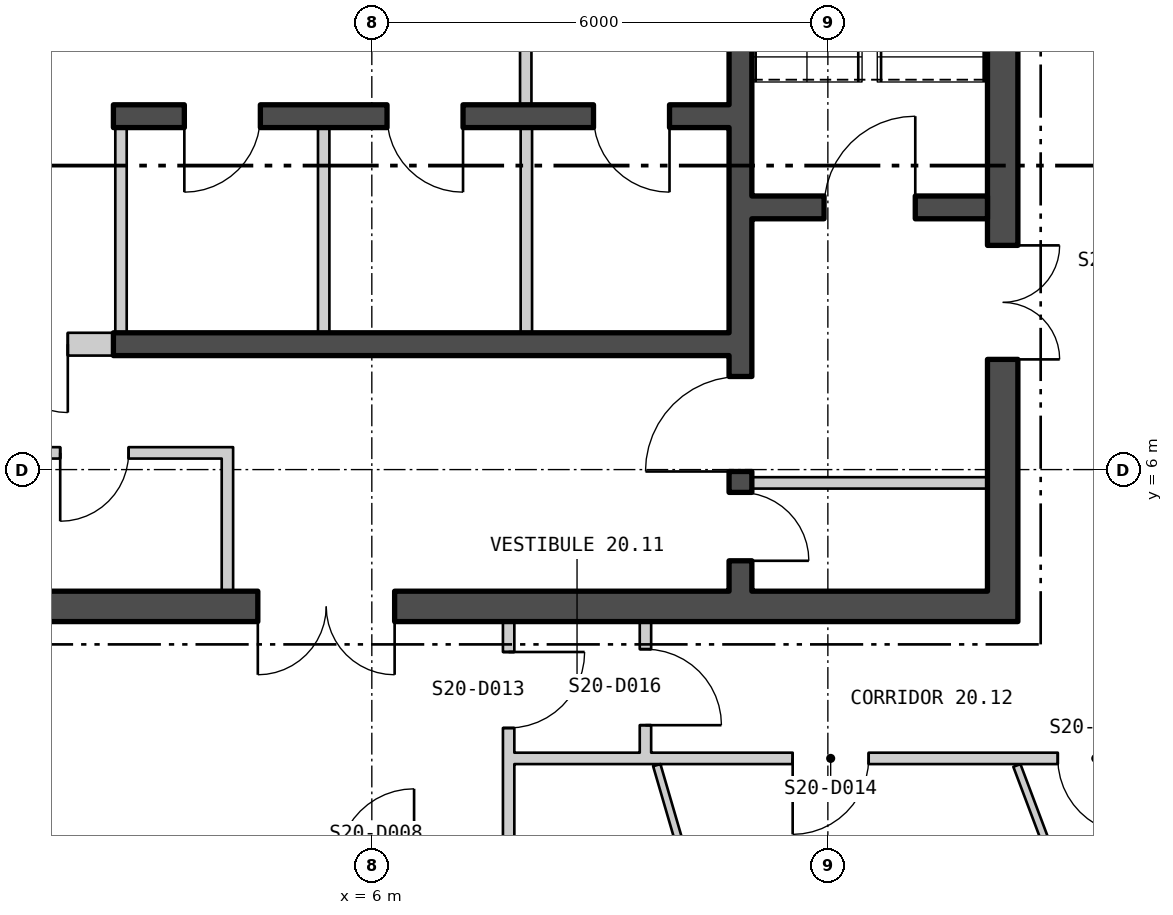
"""IFC4 building model, lengths in metres.
Left out: names, types, materials, properties, quantities, classifications, styles, units other than length and angle.
Written with IfcOpenShell. Run it as: python <this file> out.ifc"""

import sys

from ifc_helpers import new_model, si_unit, direction, frame, frame_2d, origin, place, context, subcontext, project, spatial, polyline, rectangle, outline, extrude, element, fill, save


model = new_model("IFC4")
c1 = context("Model", 3, precision=1e-05, world=origin(), true_north=direction((0.0, 1.0)))
c2 = subcontext(c1, "Body", "Model", "MODEL_VIEW")
j1 = project(units=[si_unit("LENGTHUNIT", "METRE"), si_unit("PLANEANGLEUNIT", "RADIAN")], contexts=[c1])
p1 = place(None, origin())
s1 = spatial("IfcSite", under=j1, at=p1, CompositionType="ELEMENT")
p2 = place(p1, origin())
s2 = spatial("IfcBuilding", under=s1, at=p2, CompositionType="ELEMENT")
p3 = place(p2, frame((0.0, 0.0, 268.8)))
s3 = spatial("IfcBuildingStorey", under=s2, at=p3, CompositionType="ELEMENT", Elevation=268.8)
p4 = place(p3, frame((2.67, -24.262, -0.18), z_axis=(0.0, 0.0, 1.0), x_axis=(0.499999764979, 0.866025539474, 0.0)))
e1 = element("IfcWall", 1, at=p4, inside=s3, PredefinedType="SOLIDWALL", context=c2, shape_type="SweptSolid", body=[
    extrude(outline(polyline([(-0.13, -0.225), (45.87, -0.225), (45.61, 0.225), (0.13, 0.225), (-0.13, -0.225)])), origin(), (0.0, 0.0, 1.0), 3.68),
])
p5 = place(p4, frame((1.424, 0.0, 1.08)))
e2 = element("IfcOpeningElement", 2, at=p5, cuts=e1, PredefinedType="OPENING", context=c2, shape_type="SweptSolid", body=[
    extrude(rectangle(XDim=2.4, YDim=2.0, at=frame_2d((1.2, 1.0))), frame((0.0, 0.235, 0.0), z_axis=(0.0, -1.0, 0.0), x_axis=(1.0, 0.0, 0.0)), (0.0, 0.0, 1.0), 0.47),
])
p6 = place(p4, frame((5.893, 0.0, 1.08)))
e3 = element("IfcOpeningElement", 3, at=p6, cuts=e1, PredefinedType="OPENING", context=c2, shape_type="SweptSolid", body=[
    extrude(rectangle(XDim=2.4, YDim=2.0, at=frame_2d((1.2, 1.0))), frame((0.0, 0.235, 0.0), z_axis=(0.0, -1.0, 0.0), x_axis=(1.0, 0.0, 0.0)), (0.0, 0.0, 1.0), 0.47),
])
p7 = place(p4, frame((10.401, 0.0, 1.08)))
e4 = element("IfcOpeningElement", 4, at=p7, cuts=e1, PredefinedType="OPENING", context=c2, shape_type="SweptSolid", body=[
    extrude(rectangle(XDim=2.4, YDim=2.0, at=frame_2d((1.2, 1.0))), frame((0.0, 0.235, 0.0), z_axis=(0.0, -1.0, 0.0), x_axis=(1.0, 0.0, 0.0)), (0.0, 0.0, 1.0), 0.47),
])
p8 = place(p4, frame((14.909, 0.0, 1.08)))
e5 = element("IfcOpeningElement", 5, at=p8, cuts=e1, PredefinedType="OPENING", context=c2, shape_type="SweptSolid", body=[
    extrude(rectangle(XDim=2.4, YDim=2.0, at=frame_2d((1.2, 1.0))), frame((0.0, 0.235, 0.0), z_axis=(0.0, -1.0, 0.0), x_axis=(1.0, 0.0, 0.0)), (0.0, 0.0, 1.0), 0.47),
])
p9 = place(p4, frame((23.924, 0.0, 1.08)))
e6 = element("IfcOpeningElement", 6, at=p9, cuts=e1, PredefinedType="OPENING", context=c2, shape_type="SweptSolid", body=[
    extrude(rectangle(XDim=2.4, YDim=2.0, at=frame_2d((1.2, 1.0))), frame((0.0, 0.235, 0.0), z_axis=(0.0, -1.0, 0.0), x_axis=(1.0, 0.0, 0.0)), (0.0, 0.0, 1.0), 0.47),
])
p10 = place(p4, frame((28.431, 0.0, 1.08)))
e7 = element("IfcOpeningElement", 7, at=p10, cuts=e1, PredefinedType="OPENING", context=c2, shape_type="SweptSolid", body=[
    extrude(rectangle(XDim=2.4, YDim=2.0, at=frame_2d((1.2, 1.0))), frame((0.0, 0.235, 0.0), z_axis=(0.0, -1.0, 0.0), x_axis=(1.0, 0.0, 0.0)), (0.0, 0.0, 1.0), 0.47),
])
p11 = place(p4, frame((32.939, 0.0, 1.08)))
e8 = element("IfcOpeningElement", 8, at=p11, cuts=e1, PredefinedType="OPENING", context=c2, shape_type="SweptSolid", body=[
    extrude(rectangle(XDim=2.4, YDim=2.0, at=frame_2d((1.2, 1.0))), frame((0.0, 0.235, 0.0), z_axis=(0.0, -1.0, 0.0), x_axis=(1.0, 0.0, 0.0)), (0.0, 0.0, 1.0), 0.47),
])
p12 = place(p4, frame((37.447, 0.0, 1.08)))
e9 = element("IfcOpeningElement", 9, at=p12, cuts=e1, PredefinedType="OPENING", context=c2, shape_type="SweptSolid", body=[
    extrude(rectangle(XDim=2.4, YDim=2.0, at=frame_2d((1.2, 1.0))), frame((0.0, 0.235, 0.0), z_axis=(0.0, -1.0, 0.0), x_axis=(1.0, 0.0, 0.0)), (0.0, 0.0, 1.0), 0.47),
])
p13 = place(p4, frame((41.916, 0.0, 1.08)))
e10 = element("IfcOpeningElement", 10, at=p13, cuts=e1, PredefinedType="OPENING", context=c2, shape_type="SweptSolid", body=[
    extrude(rectangle(XDim=2.4, YDim=2.0, at=frame_2d((1.2, 1.0))), frame((0.0, 0.235, 0.0), z_axis=(0.0, -1.0, 0.0), x_axis=(1.0, 0.0, 0.0)), (0.0, 0.0, 1.0), 0.47),
])
p14 = place(p3, frame((-14.5, 4.2, 0.0), z_axis=(0.0, 0.0, 1.0), x_axis=(1.0, 0.0, 0.0)))
e11 = element("IfcWall", 11, at=p14, inside=s3, PredefinedType="SHEAR", context=c2, shape_type="SweptSolid", body=[
    extrude(rectangle(XDim=29.0, YDim=0.4, at=frame_2d((14.5, 0.0))), origin(), (0.0, 0.0, 1.0), 3.7),
])
p15 = place(p14, frame((9.0, 0.0, 0.0)))
e12 = element("IfcOpeningElement", 12, at=p15, cuts=e11, PredefinedType="OPENING", context=c2, shape_type="SweptSolid", body=[
    extrude(rectangle(XDim=1.8, YDim=2.4, at=frame_2d((0.9, 1.2))), frame((0.0, 0.21, 0.0), z_axis=(0.0, -1.0, 0.0), x_axis=(1.0, 0.0, 0.0)), (0.0, 0.0, 1.0), 0.42),
])
p16 = place(p14, frame((19.0, 0.0, 0.0)))
e13 = element("IfcOpeningElement", 13, at=p16, cuts=e11, PredefinedType="OPENING", context=c2, shape_type="SweptSolid", body=[
    extrude(rectangle(XDim=1.8, YDim=2.4, at=frame_2d((0.9, 1.2))), frame((0.0, 0.21, 0.0), z_axis=(0.0, -1.0, 0.0), x_axis=(1.0, 0.0, 0.0)), (0.0, 0.0, 1.0), 0.42),
])
p17 = place(p3, frame((14.3, 4.4, 0.0), z_axis=(0.0, 0.0, 1.0), x_axis=(0.0, 1.0, 0.0)))
e14 = element("IfcWall", 14, at=p17, inside=s3, PredefinedType="SHEAR", context=c2, shape_type="SweptSolid", body=[
    extrude(rectangle(XDim=13.2, YDim=0.4, at=frame_2d((6.6, 0.0))), origin(), (0.0, 0.0, 1.0), 3.7),
])
p18 = place(p17, frame((3.05, 0.0, 0.0)))
e15 = element("IfcOpeningElement", 15, at=p18, cuts=e14, PredefinedType="OPENING", context=c2, shape_type="SweptSolid", body=[
    extrude(rectangle(XDim=1.5, YDim=2.1, at=frame_2d((0.75, 1.05))), frame((0.0, 0.21, 0.0), z_axis=(0.0, -1.0, 0.0), x_axis=(1.0, 0.0, 0.0)), (0.0, 0.0, 1.0), 0.42),
])
p19 = place(p3, frame((10.85, 4.4, 0.0), z_axis=(0.0, 0.0, 1.0), x_axis=(0.0, 1.0, 0.0)))
e16 = element("IfcWall", 16, at=p19, inside=s3, PredefinedType="SHEAR", context=c2, shape_type="SweptSolid", body=[
    extrude(rectangle(XDim=13.2, YDim=0.3, at=frame_2d((6.6, 0.0))), origin(), (0.0, 0.0, 1.0), 3.7),
])
p20 = place(p19, frame((1.575, 0.0, 0.0)))
e17 = element("IfcOpeningElement", 17, at=p20, cuts=e16, PredefinedType="OPENING", context=c2, shape_type="SweptSolid", body=[
    extrude(rectangle(XDim=1.25, YDim=2.1, at=frame_2d((0.625, 1.05))), frame((0.0, 0.16, 0.0), z_axis=(0.0, -1.0, 0.0), x_axis=(1.0, 0.0, 0.0)), (0.0, 0.0, 1.0), 0.32),
])
p21 = place(p19, frame((0.4, 0.0, 0.0)))
e18 = element("IfcOpeningElement", 18, at=p21, cuts=e16, PredefinedType="OPENING", context=c2, shape_type="SweptSolid", body=[
    extrude(rectangle(XDim=0.9, YDim=2.1, at=frame_2d((0.45, 1.05))), frame((0.0, 0.16, 0.0), z_axis=(0.0, -1.0, 0.0), x_axis=(1.0, 0.0, 0.0)), (0.0, 0.0, 1.0), 0.32),
])
p22 = place(p3, frame((11.0, 9.45, 0.0), z_axis=(0.0, 0.0, 1.0), x_axis=(1.0, 0.0, 0.0)))
e19 = element("IfcWall", 19, at=p22, inside=s3, PredefinedType="SHEAR", context=c2, shape_type="SweptSolid", body=[
    extrude(rectangle(XDim=3.1, YDim=0.3, at=frame_2d((1.55, 0.0))), origin(), (0.0, 0.0, 1.0), 3.7),
])
p23 = place(p22, frame((0.95, 0.0, 0.0)))
e20 = element("IfcOpeningElement", 20, at=p23, cuts=e19, PredefinedType="OPENING", context=c2, shape_type="SweptSolid", body=[
    extrude(rectangle(XDim=1.2, YDim=2.1, at=frame_2d((0.6, 1.05))), frame((0.0, 0.16, 0.0), z_axis=(0.0, -1.0, 0.0), x_axis=(1.0, 0.0, 0.0)), (0.0, 0.0, 1.0), 0.32),
])
p24 = place(p3, frame((2.6, 10.65, 0.0), z_axis=(0.0, 0.0, 1.0), x_axis=(1.0, 0.0, 0.0)))
e21 = element("IfcWall", 21, at=p24, inside=s3, PredefinedType="SHEAR", context=c2, shape_type="SweptSolid", body=[
    extrude(rectangle(XDim=8.1, YDim=0.3, at=frame_2d((4.05, 0.0))), origin(), (0.0, 0.0, 1.0), 3.7),
])
p25 = place(p24, frame((0.933, 0.0, 0.0)))
e22 = element("IfcOpeningElement", 22, at=p25, cuts=e21, PredefinedType="OPENING", context=c2, shape_type="SweptSolid", body=[
    extrude(rectangle(XDim=1.0, YDim=2.1, at=frame_2d((0.5, 1.05))), frame((0.0, 0.16, 0.0), z_axis=(0.0, -1.0, 0.0), x_axis=(1.0, 0.0, 0.0)), (0.0, 0.0, 1.0), 0.32),
])
p26 = place(p24, frame((3.6, 0.0, 0.0)))
e23 = element("IfcOpeningElement", 23, at=p26, cuts=e21, PredefinedType="OPENING", context=c2, shape_type="SweptSolid", body=[
    extrude(rectangle(XDim=1.0, YDim=2.1, at=frame_2d((0.5, 1.05))), frame((0.0, 0.16, 0.0), z_axis=(0.0, -1.0, 0.0), x_axis=(1.0, 0.0, 0.0)), (0.0, 0.0, 1.0), 0.32),
])
p27 = place(p24, frame((6.317, 0.0, 0.0)))
e24 = element("IfcOpeningElement", 24, at=p27, cuts=e21, PredefinedType="OPENING", context=c2, shape_type="SweptSolid", body=[
    extrude(rectangle(XDim=1.0, YDim=2.1, at=frame_2d((0.5, 1.05))), frame((0.0, 0.16, 0.0), z_axis=(0.0, -1.0, 0.0), x_axis=(1.0, 0.0, 0.0)), (0.0, 0.0, 1.0), 0.32),
])
p28 = place(p3, frame((2.6, 7.65, 0.0), z_axis=(0.0, 0.0, 1.0), x_axis=(1.0, 0.0, 0.0)))
e25 = element("IfcWall", 25, at=p28, inside=s3, PredefinedType="SHEAR", context=c2, shape_type="SweptSolid", body=[
    extrude(rectangle(XDim=8.1, YDim=0.3, at=frame_2d((4.05, 0.0))), origin(), (0.0, 0.0, 1.0), 3.7),
])
for number, where, z_axis, x_axis in (
    (26, (2.7, 7.8, 0.0), (0.0, 0.0, 1.0), (0.0, 1.0, 0.0)),
    (27, (5.367, 7.8, 0.0), (0.0, 0.0, 1.0), (0.0, 1.0, 0.0)),
    (28, (8.033, 7.8, 0.0), (0.0, 0.0, 1.0), (0.0, 1.0, 0.0)),
):
    element("IfcWall", number, at=place(p3, frame(where, z_axis=z_axis, x_axis=x_axis)), inside=s3, PredefinedType="PARTITIONING", context=c2, shape_type="SweptSolid", body=[
        extrude(rectangle(XDim=2.7, YDim=0.15, at=frame_2d((1.35, 0.0))), origin(), (0.0, 0.0, 1.0), 3.7),
    ])
p29 = place(p3, frame((8.025, 10.8, 0.0), z_axis=(0.0, 0.0, 1.0), x_axis=(0.0, 1.0, 0.0)))
e29 = element("IfcWall", 29, at=p29, inside=s3, PredefinedType="PARTITIONING", context=c2, shape_type="SweptSolid", body=[
    extrude(rectangle(XDim=3.6, YDim=0.15, at=frame_2d((1.8, 0.0))), origin(), (0.0, 0.0, 1.0), 3.7),
])
p30 = place(p29, frame((1.175, 0.0, 0.0)))
e30 = element("IfcOpeningElement", 30, at=p30, cuts=e29, PredefinedType="OPENING", context=c2, shape_type="SweptSolid", body=[
    extrude(rectangle(XDim=1.25, YDim=2.1, at=frame_2d((0.625, 1.05))), frame((0.0, 0.085, 0.0), z_axis=(0.0, -1.0, 0.0), x_axis=(1.0, 0.0, 0.0)), (0.0, 0.0, 1.0), 0.17),
])
p31 = place(p3, frame((11.0, 5.825, 0.0), z_axis=(0.0, 0.0, 1.0), x_axis=(1.0, 0.0, 0.0)))
e31 = element("IfcWall", 31, at=p31, inside=s3, PredefinedType="PARTITIONING", context=c2, shape_type="SweptSolid", body=[
    extrude(rectangle(XDim=3.1, YDim=0.15, at=frame_2d((1.55, 0.0))), origin(), (0.0, 0.0, 1.0), 3.7),
])
p32 = place(p3, frame((4.1, 4.4, 0.0), z_axis=(0.0, 0.0, 1.0), x_axis=(0.0, 1.0, 0.0)))
e32 = element("IfcWall", 32, at=p32, inside=s3, PredefinedType="PARTITIONING", context=c2, shape_type="SweptSolid", body=[
    extrude(rectangle(XDim=1.895, YDim=0.15, at=frame_2d((0.948, 0.0))), origin(), (0.0, 0.0, 1.0), 3.7),
])
p33 = place(p3, frame((0.675, 6.22, 0.0), z_axis=(0.0, 0.0, 1.0), x_axis=(1.0, 0.0, 0.0)))
e33 = element("IfcWall", 33, at=p33, inside=s3, PredefinedType="PARTITIONING", context=c2, shape_type="SweptSolid", body=[
    extrude(rectangle(XDim=3.35, YDim=0.15, at=frame_2d((1.675, 0.0))), origin(), (0.0, 0.0, 1.0), 3.7),
])
p34 = place(p33, frame((1.225, 0.0, 0.0)))
e34 = element("IfcOpeningElement", 34, at=p34, cuts=e33, PredefinedType="OPENING", context=c2, shape_type="SweptSolid", body=[
    extrude(rectangle(XDim=0.9, YDim=2.1, at=frame_2d((0.45, 1.05))), frame((0.0, 0.085, 0.0), z_axis=(0.0, -1.0, 0.0), x_axis=(1.0, 0.0, 0.0)), (0.0, 0.0, 1.0), 0.17),
])
p35 = place(p3, frame((-0.4, 7.65, 0.0), z_axis=(0.0, 0.0, 1.0), x_axis=(1.0, 0.0, 0.0)))
e35 = element("IfcWall", 35, at=p35, inside=s3, PredefinedType="PARTITIONING", context=c2, shape_type="SweptSolid", body=[
    extrude(rectangle(XDim=3.0, YDim=0.3, at=frame_2d((1.5, 0.0))), origin(), (0.0, 0.0, 1.0), 3.7),
])
p36 = place(p35, frame((0.6, 0.0, 0.0)))
e36 = element("IfcOpeningElement", 36, at=p36, cuts=e35, PredefinedType="OPENING", context=c2, shape_type="SweptSolid", body=[
    extrude(rectangle(XDim=1.8, YDim=2.4, at=frame_2d((0.9, 1.2))), frame((0.0, 0.16, 0.0), z_axis=(0.0, -1.0, 0.0), x_axis=(1.0, 0.0, 0.0)), (0.0, 0.0, 1.0), 0.32),
])
p37 = place(p3, frame((7.8, -13.675, 0.0), z_axis=(0.0, 0.0, 1.0), x_axis=(0.0, 1.0, 0.0)))
e37 = element("IfcWall", 37, at=p37, inside=s3, PredefinedType="PARTITIONING", context=c2, shape_type="SweptSolid", body=[
    extrude(rectangle(XDim=17.675, YDim=0.15, at=frame_2d((8.838, 0.0))), origin(), (0.0, 0.0, 1.0), 3.7),
])
p38 = place(p37, frame((4.552, 0.0, 0.0)))
e38 = element("IfcOpeningElement", 38, at=p38, cuts=e37, PredefinedType="OPENING", context=c2, shape_type="SweptSolid", body=[
    extrude(rectangle(XDim=1.0, YDim=2.1, at=frame_2d((0.5, 1.05))), frame((0.0, 0.085, 0.0), z_axis=(0.0, -1.0, 0.0), x_axis=(1.0, 0.0, 0.0)), (0.0, 0.0, 1.0), 0.17),
])
p39 = place(p37, frame((13.287, 0.0, 0.0)))
e39 = element("IfcOpeningElement", 39, at=p39, cuts=e37, PredefinedType="OPENING", context=c2, shape_type="SweptSolid", body=[
    extrude(rectangle(XDim=1.0, YDim=2.1, at=frame_2d((0.5, 1.05))), frame((0.0, 0.085, 0.0), z_axis=(0.0, -1.0, 0.0), x_axis=(1.0, 0.0, 0.0)), (0.0, 0.0, 1.0), 0.17),
])
p40 = place(p37, frame((16.275, 0.0, 0.0)))
e40 = element("IfcOpeningElement", 40, at=p40, cuts=e37, PredefinedType="OPENING", context=c2, shape_type="SweptSolid", body=[
    extrude(rectangle(XDim=1.0, YDim=2.1, at=frame_2d((0.5, 1.05))), frame((0.0, 0.085, 0.0), z_axis=(0.0, -1.0, 0.0), x_axis=(1.0, 0.0, 0.0)), (0.0, 0.0, 1.0), 0.17),
])
p41 = place(p3, frame((7.875, 2.2, 0.0), z_axis=(0.0, 0.0, 1.0), x_axis=(1.0, 0.0, 0.0)))
e41 = element("IfcWall", 41, at=p41, inside=s3, PredefinedType="PARTITIONING", context=c2, shape_type="SweptSolid", body=[
    extrude(rectangle(XDim=8.35, YDim=0.15, at=frame_2d((4.175, 0.0))), origin(), (0.0, 0.0, 1.0), 3.7),
])
p42 = place(p41, frame((3.662, 0.0, 0.0)))
e42 = element("IfcOpeningElement", 42, at=p42, cuts=e41, PredefinedType="OPENING", context=c2, shape_type="SweptSolid", body=[
    extrude(rectangle(XDim=1.0, YDim=2.1, at=frame_2d((0.5, 1.05))), frame((0.0, 0.085, 0.0), z_axis=(0.0, -1.0, 0.0), x_axis=(1.0, 0.0, 0.0)), (0.0, 0.0, 1.0), 0.17),
])
p43 = place(p41, frame((7.15, 0.0, 0.0)))
e43 = element("IfcOpeningElement", 43, at=p43, cuts=e41, PredefinedType="OPENING", context=c2, shape_type="SweptSolid", body=[
    extrude(rectangle(XDim=1.0, YDim=2.1, at=frame_2d((0.5, 1.05))), frame((0.0, 0.085, 0.0), z_axis=(0.0, -1.0, 0.0), x_axis=(1.0, 0.0, 0.0)), (0.0, 0.0, 1.0), 0.17),
])
p44 = place(p3, frame((9.6, 2.275, 0.0), z_axis=(0.0, 0.0, 1.0), x_axis=(0.0, 1.0, 0.0)))
e44 = element("IfcWall", 44, at=p44, inside=s3, PredefinedType="PARTITIONING", context=c2, shape_type="SweptSolid", body=[
    extrude(rectangle(XDim=1.725, YDim=0.15, at=frame_2d((0.863, 0.0))), origin(), (0.0, 0.0, 1.0), 3.2),
])
p45 = place(p44, frame((0.362, 0.0, 0.0)))
e45 = element("IfcOpeningElement", 45, at=p45, cuts=e44, PredefinedType="OPENING", context=c2, shape_type="SweptSolid", body=[
    extrude(rectangle(XDim=1.0, YDim=2.1, at=frame_2d((0.5, 1.05))), frame((0.0, 0.085, 0.0), z_axis=(0.0, -1.0, 0.0), x_axis=(1.0, 0.0, 0.0)), (0.0, 0.0, 1.0), 0.17),
])
p46 = place(p3, frame((9.749, 2.111, 0.0), z_axis=(0.0, 0.0, 1.0), x_axis=(0.280109672534, -0.95996800538, 0.0)))
e46 = element("IfcWall", 46, at=p46, inside=s3, PredefinedType="PARTITIONING", context=c2, shape_type="SweptSolid", body=[
    extrude(rectangle(XDim=9.453, YDim=0.1, at=frame_2d((4.727, 0.0))), origin(), (0.0, 0.0, 1.0), 3.7),
])
p47 = place(p3, frame((14.487, 2.107, 0.0), z_axis=(0.0, 0.0, 1.0), x_axis=(0.352242085743, -0.935908923471, 0.0)))
e47 = element("IfcWall", 47, at=p47, inside=s3, PredefinedType="PARTITIONING", context=c2, shape_type="SweptSolid", body=[
    extrude(rectangle(XDim=3.526, YDim=0.1, at=frame_2d((1.763, 0.0))), origin(), (0.0, 0.0, 1.0), 3.7),
])
p48 = place(p25, origin())
e48 = element("IfcDoor", 48, at=p48, inside=s3, OperationType="SINGLE_SWING_LEFT", PredefinedType="DOOR", context=c2, shape_type="SweptSolid", body=[
    extrude(rectangle(XDim=1.0, YDim=2.1, at=frame_2d((0.5, 1.05))), frame((0.0, 0.025, 0.0), z_axis=(0.0, -1.0, 0.0), x_axis=(1.0, 0.0, 0.0)), (0.0, 0.0, 1.0), 0.05),
])
fill(e22, e48)
p49 = place(p26, origin())
e49 = element("IfcDoor", 49, at=p49, inside=s3, OperationType="SINGLE_SWING_RIGHT", PredefinedType="DOOR", context=c2, shape_type="SweptSolid", body=[
    extrude(rectangle(XDim=1.0, YDim=2.1, at=frame_2d((0.5, 1.05))), frame((0.0, 0.025, 0.0), z_axis=(0.0, -1.0, 0.0), x_axis=(1.0, 0.0, 0.0)), (0.0, 0.0, 1.0), 0.05),
])
fill(e23, e49)
p50 = place(p27, origin())
e50 = element("IfcDoor", 50, at=p50, inside=s3, OperationType="SINGLE_SWING_RIGHT", PredefinedType="DOOR", context=c2, shape_type="SweptSolid", body=[
    extrude(rectangle(XDim=1.0, YDim=2.1, at=frame_2d((0.5, 1.05))), frame((0.0, 0.025, 0.0), z_axis=(0.0, -1.0, 0.0), x_axis=(1.0, 0.0, 0.0)), (0.0, 0.0, 1.0), 0.05),
])
fill(e24, e50)
p51 = place(p23, origin())
e51 = element("IfcDoor", 51, at=p51, inside=s3, OperationType="SINGLE_SWING_LEFT", PredefinedType="DOOR", context=c2, shape_type="SweptSolid", body=[
    extrude(rectangle(XDim=1.2, YDim=2.1, at=frame_2d((0.6, 1.05))), frame((0.0, 0.025, 0.0), z_axis=(0.0, -1.0, 0.0), x_axis=(1.0, 0.0, 0.0)), (0.0, 0.0, 1.0), 0.05),
])
fill(e20, e51)
p52 = place(p20, origin())
e52 = element("IfcDoor", 52, at=p52, inside=s3, OperationType="SINGLE_SWING_RIGHT", PredefinedType="DOOR", context=c2, shape_type="SweptSolid", body=[
    extrude(rectangle(XDim=1.25, YDim=2.1, at=frame_2d((0.625, 1.05))), frame((0.0, 0.025, 0.0), z_axis=(0.0, -1.0, 0.0), x_axis=(1.0, 0.0, 0.0)), (0.0, 0.0, 1.0), 0.05),
])
fill(e17, e52)
p53 = place(p18, origin())
e53 = element("IfcDoor", 53, at=p53, inside=s3, OperationType="DOUBLE_DOOR_SINGLE_SWING", PredefinedType="DOOR", context=c2, shape_type="SweptSolid", body=[
    extrude(rectangle(XDim=1.5, YDim=2.1, at=frame_2d((0.75, 1.05))), frame((0.0, 0.025, 0.0), z_axis=(0.0, -1.0, 0.0), x_axis=(1.0, 0.0, 0.0)), (0.0, 0.0, 1.0), 0.05),
])
fill(e15, e53)
p54 = place(p21, origin())
e54 = element("IfcDoor", 54, at=p54, inside=s3, OperationType="SINGLE_SWING_LEFT", PredefinedType="DOOR", context=c2, shape_type="SweptSolid", body=[
    extrude(rectangle(XDim=0.9, YDim=2.1, at=frame_2d((0.45, 1.05))), frame((0.0, 0.025, 0.0), z_axis=(0.0, -1.0, 0.0), x_axis=(1.0, 0.0, 0.0)), (0.0, 0.0, 1.0), 0.05),
])
fill(e18, e54)
p55 = place(p34, origin())
e55 = element("IfcDoor", 55, at=p55, inside=s3, OperationType="SINGLE_SWING_LEFT", PredefinedType="DOOR", context=c2, shape_type="SweptSolid", body=[
    extrude(rectangle(XDim=0.9, YDim=2.1, at=frame_2d((0.45, 1.05))), frame((0.0, 0.025, 0.0), z_axis=(0.0, -1.0, 0.0), x_axis=(1.0, 0.0, 0.0)), (0.0, 0.0, 1.0), 0.05),
])
fill(e34, e55)
p56 = place(p36, origin())
e56 = element("IfcDoor", 56, at=p56, inside=s3, OperationType="DOUBLE_DOOR_SINGLE_SWING", PredefinedType="DOOR", context=c2, shape_type="SweptSolid", body=[
    extrude(rectangle(XDim=1.8, YDim=2.4, at=frame_2d((0.9, 1.2))), frame((0.0, 0.025, 0.0), z_axis=(0.0, -1.0, 0.0), x_axis=(1.0, 0.0, 0.0)), (0.0, 0.0, 1.0), 0.05),
])
fill(e36, e56)
p57 = place(p16, origin())
e57 = element("IfcDoor", 57, at=p57, inside=s3, OperationType="DOUBLE_DOOR_SINGLE_SWING", PredefinedType="DOOR", context=c2, shape_type="SweptSolid", body=[
    extrude(rectangle(XDim=1.8, YDim=2.4, at=frame_2d((0.9, 1.2))), frame((0.0, 0.025, 0.0), z_axis=(0.0, -1.0, 0.0), x_axis=(1.0, 0.0, 0.0)), (0.0, 0.0, 1.0), 0.05),
])
fill(e13, e57)
p58 = place(p40, origin())
e58 = element("IfcDoor", 58, at=p58, inside=s3, OperationType="SINGLE_SWING_RIGHT", PredefinedType="DOOR", context=c2, shape_type="SweptSolid", body=[
    extrude(rectangle(XDim=1.0, YDim=2.1, at=frame_2d((0.5, 1.05))), frame((0.0, 0.025, 0.0), z_axis=(0.0, -1.0, 0.0), x_axis=(1.0, 0.0, 0.0)), (0.0, 0.0, 1.0), 0.05),
])
fill(e40, e58)
p59 = place(p42, origin())
e59 = element("IfcDoor", 59, at=p59, inside=s3, OperationType="SINGLE_SWING_LEFT", PredefinedType="DOOR", context=c2, shape_type="SweptSolid", body=[
    extrude(rectangle(XDim=1.0, YDim=2.1, at=frame_2d((0.5, 1.05))), frame((0.0, 0.025, 0.0), z_axis=(0.0, -1.0, 0.0), x_axis=(1.0, 0.0, 0.0)), (0.0, 0.0, 1.0), 0.05),
])
fill(e42, e59)
p60 = place(p43, origin())
e60 = element("IfcDoor", 60, at=p60, inside=s3, OperationType="SINGLE_SWING_RIGHT", PredefinedType="DOOR", context=c2, shape_type="SweptSolid", body=[
    extrude(rectangle(XDim=1.0, YDim=2.1, at=frame_2d((0.5, 1.05))), frame((0.0, 0.025, 0.0), z_axis=(0.0, -1.0, 0.0), x_axis=(1.0, 0.0, 0.0)), (0.0, 0.0, 1.0), 0.05),
])
fill(e43, e60)
p61 = place(p45, origin())
e61 = element("IfcDoor", 61, at=p61, inside=s3, OperationType="SINGLE_SWING_LEFT", PredefinedType="DOOR", context=c2, shape_type="SweptSolid", body=[
    extrude(rectangle(XDim=1.0, YDim=2.1, at=frame_2d((0.5, 1.05))), frame((0.0, 0.025, 0.0), z_axis=(0.0, -1.0, 0.0), x_axis=(1.0, 0.0, 0.0)), (0.0, 0.0, 1.0), 0.05),
])
fill(e45, e61)
save(model, sys.argv[1])
